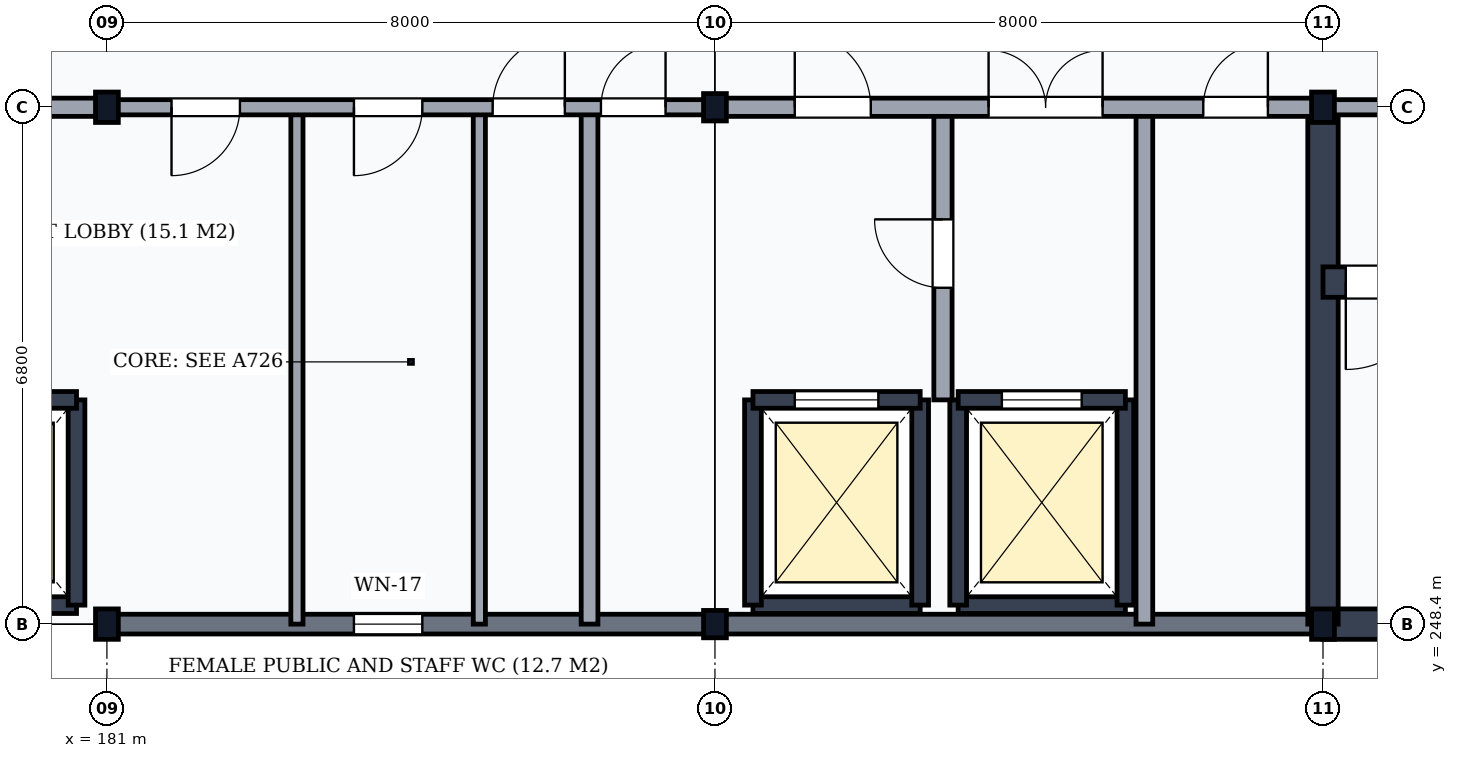
"""IFC4 building model, lengths in metres.
Left out: names, types, materials, properties, quantities, classifications, styles, units other than length and angle.
Written with IfcOpenShell. Run it as: python <this file> out.ifc"""

import sys

from ifc_helpers import new_model, si_unit, direction, frame, frame_2d, origin, origin_2d, place, context, subcontext, project, spatial, rectangle, i_section, extrude, element, fill, save


model = new_model("IFC4")
c1 = context("Model", 3, precision=1e-05, world=origin(), true_north=direction((0.0, 1.0)))
c2 = subcontext(c1, "Body", "Model", "MODEL_VIEW")
j1 = project(units=[si_unit("LENGTHUNIT", "METRE"), si_unit("PLANEANGLEUNIT", "RADIAN")], contexts=[c1])
p1 = place(None, origin())
s1 = spatial("IfcSite", under=j1, at=p1, CompositionType="ELEMENT")
p2 = place(p1, origin())
s2 = spatial("IfcBuilding", under=s1, at=p2, CompositionType="ELEMENT")
p3 = place(p2, frame((0.0, 0.0, 63.9)))
s3 = spatial("IfcBuildingStorey", under=s2, at=p3, CompositionType="ELEMENT", Elevation=63.9)
for number, where, z_axis, x_axis in (
    (1, (181.0, 248.4, 0.0), (0.0, 0.0, 1.0), (1.0, 0.0, 0.0)),
    (2, (181.0, 255.2, 0.0), (0.0, 0.0, 1.0), (1.0, 0.0, 0.0)),
):
    element("IfcColumn", number, at=place(p3, frame(where, z_axis=z_axis, x_axis=x_axis)), inside=s3, PredefinedType="COLUMN", context=c2, shape_type="SweptSolid", body=[
        extrude(i_section(OverallWidth=0.3, OverallDepth=0.4, WebThickness=0.013, FlangeThickness=0.024, FilletRadius=0.027, at=origin_2d()), origin(), (0.0, 0.0, 1.0), 3.9),
    ])
for number, where, z_axis, x_axis in (
    (3, (189.0, 248.4, 0.0), (0.0, 0.0, 1.0), (1.0, 0.0, 0.0)),
    (4, (189.0, 255.2, 0.0), (0.0, 0.0, 1.0), (1.0, 0.0, 0.0)),
):
    element("IfcColumn", number, at=place(p3, frame(where, z_axis=z_axis, x_axis=x_axis)), inside=s3, PredefinedType="COLUMN", context=c2, shape_type="SweptSolid", body=[
        extrude(i_section(OverallWidth=0.3, OverallDepth=0.36, WebThickness=0.012, FlangeThickness=0.022, FilletRadius=0.027, at=origin_2d()), origin(), (0.0, 0.0, 1.0), 3.9),
    ])
for number, where, z_axis, x_axis in (
    (5, (197.0, 248.4, 0.0), (0.0, 0.0, 1.0), (1.0, 0.0, 0.0)),
    (6, (197.0, 255.2, 0.0), (0.0, 0.0, 1.0), (1.0, 0.0, 0.0)),
):
    element("IfcColumn", number, at=place(p3, frame(where, z_axis=z_axis, x_axis=x_axis)), inside=s3, PredefinedType="COLUMN", context=c2, shape_type="SweptSolid", body=[
        extrude(i_section(OverallWidth=0.3, OverallDepth=0.4, WebThickness=0.013, FlangeThickness=0.024, FilletRadius=0.027, at=origin_2d()), origin(), (0.0, 0.0, 1.0), 3.9),
    ])
p4 = place(p3, frame((181.006, 248.4, 0.0), z_axis=(0.0, 0.0, 1.0), x_axis=(1.0, 0.0, 0.0)))
e7 = element("IfcWall", 7, at=p4, inside=s3, PredefinedType="SOLIDWALL", context=c2, shape_type="SweptSolid", body=[
    extrude(rectangle(XDim=7.988, YDim=0.26, at=frame_2d((3.994, 0.0))), origin(), (0.0, 0.0, 1.0), 3.388),
])
p5 = place(p4, frame((3.244, 0.0, 0.95)))
e8 = element("IfcOpeningElement", 8, at=p5, cuts=e7, PredefinedType="OPENING", context=c2, shape_type="SweptSolid", body=[
    extrude(rectangle(XDim=0.9, YDim=2.2, at=frame_2d((0.45, 1.1))), frame((0.0, 0.145, 0.0), z_axis=(0.0, -1.0, 0.0), x_axis=(1.0, 0.0, 0.0)), (0.0, 0.0, 1.0), 0.29),
])
p6 = place(p3, frame((189.006, 248.4, 0.0), z_axis=(0.0, 0.0, 1.0), x_axis=(1.0, 0.0, 0.0)))
e9 = element("IfcWall", 9, at=p6, inside=s3, PredefinedType="SOLIDWALL", context=c2, shape_type="SweptSolid", body=[
    extrude(rectangle(XDim=7.988, YDim=0.26, at=frame_2d((3.994, 0.0))), origin(), (0.0, 0.0, 1.0), 3.388),
])
p7 = place(p3, frame((197.0, 248.4, 0.0), z_axis=(0.0, 0.0, 1.0), x_axis=(1.0, 0.0, 0.0)))
e10 = element("IfcWall", 10, at=p7, inside=s3, PredefinedType="SHEAR", context=c2, shape_type="SweptSolid", body=[
    extrude(rectangle(XDim=8.0, YDim=0.4, at=frame_2d((4.0, 0.0))), origin(), (0.0, 0.0, 1.0), 3.7),
])
p8 = place(p3, frame((197.0, 248.4, 0.0), z_axis=(0.0, 0.0, 1.0), x_axis=(0.0, 1.0, 0.0)))
e11 = element("IfcWall", 11, at=p8, inside=s3, PredefinedType="SHEAR", context=c2, shape_type="SweptSolid", body=[
    extrude(rectangle(XDim=6.8, YDim=0.4, at=frame_2d((3.4, 0.0))), origin(), (0.0, 0.0, 1.0), 3.7),
])
p9 = place(p3, frame((197.0, 252.9, 0.0), z_axis=(0.0, 0.0, 1.0), x_axis=(1.0, 0.0, 0.0)))
e12 = element("IfcWall", 12, at=p9, inside=s3, PredefinedType="SHEAR", context=c2, shape_type="SweptSolid", body=[
    extrude(rectangle(XDim=8.0, YDim=0.4, at=frame_2d((4.0, 0.0))), origin(), (0.0, 0.0, 1.0), 3.7),
])
p10 = place(p9, frame((0.3, 0.0, 0.0)))
e13 = element("IfcOpeningElement", 13, at=p10, cuts=e12, PredefinedType="OPENING", context=c2, shape_type="SweptSolid", body=[
    extrude(rectangle(XDim=1.15, YDim=2.15, at=frame_2d((0.575, 1.075))), frame((0.0, 0.215, 0.0), z_axis=(0.0, -1.0, 0.0), x_axis=(1.0, 0.0, 0.0)), (0.0, 0.0, 1.0), 0.43),
])
p11 = place(p3, frame((197.0, 255.2, 0.0), z_axis=(0.0, 0.0, 1.0), x_axis=(1.0, 0.0, 0.0)))
e14 = element("IfcWall", 14, at=p11, inside=s3, PredefinedType="PARTITIONING", context=c2, shape_type="SweptSolid", body=[
    extrude(rectangle(XDim=8.0, YDim=0.2, at=frame_2d((4.0, 0.0))), origin(), (0.0, 0.0, 1.0), 3.148),
])
p12 = place(p11, frame((3.275, 0.0, 0.0)))
e15 = element("IfcOpeningElement", 15, at=p12, cuts=e14, PredefinedType="OPENING", context=c2, shape_type="SweptSolid", body=[
    extrude(rectangle(XDim=1.45, YDim=2.2, at=frame_2d((0.725, 1.1))), frame((0.0, 0.115, 0.0), z_axis=(0.0, -1.0, 0.0), x_axis=(1.0, 0.0, 0.0)), (0.0, 0.0, 1.0), 0.23),
])
p13 = place(p3, frame((178.4, 248.65, 0.0), z_axis=(0.0, 0.0, 1.0), x_axis=(1.0, 0.0, 0.0)))
e16 = element("IfcWall", 16, at=p13, inside=s3, PredefinedType="SHEAR", context=c2, shape_type="SweptSolid", body=[
    extrude(rectangle(XDim=2.2, YDim=0.22, at=frame_2d((1.1, 0.0))), origin(), (0.0, 0.0, 1.0), 3.7),
])
p14 = place(p3, frame((180.6, 248.65, 0.0), z_axis=(0.0, 0.0, 1.0), x_axis=(0.0, 1.0, 0.0)))
e17 = element("IfcWall", 17, at=p14, inside=s3, PredefinedType="SHEAR", context=c2, shape_type="SweptSolid", body=[
    extrude(rectangle(XDim=2.7, YDim=0.22, at=frame_2d((1.35, 0.0))), origin(), (0.0, 0.0, 1.0), 3.7),
])
p15 = place(p3, frame((178.4, 251.35, 0.0), z_axis=(0.0, 0.0, 1.0), x_axis=(1.0, 0.0, 0.0)))
e18 = element("IfcWall", 18, at=p15, inside=s3, PredefinedType="SHEAR", context=c2, shape_type="SweptSolid", body=[
    extrude(rectangle(XDim=2.2, YDim=0.22, at=frame_2d((1.1, 0.0))), origin(), (0.0, 0.0, 1.0), 3.7),
])
p16 = place(p15, frame((0.575, 0.0, 0.0)))
e19 = element("IfcOpeningElement", 19, at=p16, cuts=e18, PredefinedType="OPENING", context=c2, shape_type="SweptSolid", body=[
    extrude(rectangle(XDim=1.05, YDim=2.15, at=frame_2d((0.525, 1.075))), frame((0.0, 0.125, 0.0), z_axis=(0.0, -1.0, 0.0), x_axis=(1.0, 0.0, 0.0)), (0.0, 0.0, 1.0), 0.25),
])
p17 = place(p3, frame((189.5, 248.65, 0.0), z_axis=(0.0, 0.0, 1.0), x_axis=(1.0, 0.0, 0.0)))
e20 = element("IfcWall", 20, at=p17, inside=s3, PredefinedType="SHEAR", context=c2, shape_type="SweptSolid", body=[
    extrude(rectangle(XDim=2.2, YDim=0.22, at=frame_2d((1.1, 0.0))), origin(), (0.0, 0.0, 1.0), 3.7),
])
for number, where, z_axis, x_axis in (
    (21, (189.5, 248.65, 0.0), (0.0, 0.0, 1.0), (0.0, 1.0, 0.0)),
    (22, (191.7, 248.65, 0.0), (0.0, 0.0, 1.0), (0.0, 1.0, 0.0)),
):
    element("IfcWall", number, at=place(p3, frame(where, z_axis=z_axis, x_axis=x_axis)), inside=s3, PredefinedType="SHEAR", context=c2, shape_type="SweptSolid", body=[
        extrude(rectangle(XDim=2.7, YDim=0.22, at=frame_2d((1.35, 0.0))), origin(), (0.0, 0.0, 1.0), 3.7),
    ])
p18 = place(p3, frame((189.5, 251.35, 0.0), z_axis=(0.0, 0.0, 1.0), x_axis=(1.0, 0.0, 0.0)))
e23 = element("IfcWall", 23, at=p18, inside=s3, PredefinedType="SHEAR", context=c2, shape_type="SweptSolid", body=[
    extrude(rectangle(XDim=2.2, YDim=0.22, at=frame_2d((1.1, 0.0))), origin(), (0.0, 0.0, 1.0), 3.7),
])
p19 = place(p18, frame((0.55, 0.0, 0.0)))
e24 = element("IfcOpeningElement", 24, at=p19, cuts=e23, PredefinedType="OPENING", context=c2, shape_type="SweptSolid", body=[
    extrude(rectangle(XDim=1.1, YDim=2.15, at=frame_2d((0.55, 1.075))), frame((0.0, 0.125, 0.0), z_axis=(0.0, -1.0, 0.0), x_axis=(1.0, 0.0, 0.0)), (0.0, 0.0, 1.0), 0.25),
])
p20 = place(p3, frame((192.2, 248.65, 0.0), z_axis=(0.0, 0.0, 1.0), x_axis=(1.0, 0.0, 0.0)))
e25 = element("IfcWall", 25, at=p20, inside=s3, PredefinedType="SHEAR", context=c2, shape_type="SweptSolid", body=[
    extrude(rectangle(XDim=2.2, YDim=0.22, at=frame_2d((1.1, 0.0))), origin(), (0.0, 0.0, 1.0), 3.7),
])
for number, where, z_axis, x_axis in (
    (26, (192.2, 248.65, 0.0), (0.0, 0.0, 1.0), (0.0, 1.0, 0.0)),
    (27, (194.4, 248.65, 0.0), (0.0, 0.0, 1.0), (0.0, 1.0, 0.0)),
):
    element("IfcWall", number, at=place(p3, frame(where, z_axis=z_axis, x_axis=x_axis)), inside=s3, PredefinedType="SHEAR", context=c2, shape_type="SweptSolid", body=[
        extrude(rectangle(XDim=2.7, YDim=0.22, at=frame_2d((1.35, 0.0))), origin(), (0.0, 0.0, 1.0), 3.7),
    ])
p21 = place(p3, frame((192.2, 251.35, 0.0), z_axis=(0.0, 0.0, 1.0), x_axis=(1.0, 0.0, 0.0)))
e28 = element("IfcWall", 28, at=p21, inside=s3, PredefinedType="SHEAR", context=c2, shape_type="SweptSolid", body=[
    extrude(rectangle(XDim=2.2, YDim=0.22, at=frame_2d((1.1, 0.0))), origin(), (0.0, 0.0, 1.0), 3.7),
])
p22 = place(p21, frame((0.575, 0.0, 0.0)))
e29 = element("IfcOpeningElement", 29, at=p22, cuts=e28, PredefinedType="OPENING", context=c2, shape_type="SweptSolid", body=[
    extrude(rectangle(XDim=1.05, YDim=2.15, at=frame_2d((0.525, 1.075))), frame((0.0, 0.125, 0.0), z_axis=(0.0, -1.0, 0.0), x_axis=(1.0, 0.0, 0.0)), (0.0, 0.0, 1.0), 0.25),
])
p23 = place(p3, frame((192.0, 251.35, 0.0), z_axis=(0.0, 0.0, 1.0), x_axis=(0.0, 1.0, 0.0)))
e30 = element("IfcWall", 30, at=p23, inside=s3, PredefinedType="PARTITIONING", context=c2, shape_type="SweptSolid", body=[
    extrude(rectangle(XDim=3.85, YDim=0.24, at=frame_2d((1.925, 0.0))), origin(), (0.0, 0.0, 1.0), 3.7),
])
p24 = place(p23, frame((1.475, 0.0, 0.0)))
e31 = element("IfcOpeningElement", 31, at=p24, cuts=e30, PredefinedType="OPENING", context=c2, shape_type="SweptSolid", body=[
    extrude(rectangle(XDim=0.9, YDim=2.1, at=frame_2d((0.45, 1.05))), frame((0.0, 0.135, 0.0), z_axis=(0.0, -1.0, 0.0), x_axis=(1.0, 0.0, 0.0)), (0.0, 0.0, 1.0), 0.27),
])
p25 = place(p3, frame((194.65, 248.4, 0.0), z_axis=(0.0, 0.0, 1.0), x_axis=(0.0, 1.0, 0.0)))
e32 = element("IfcWall", 32, at=p25, inside=s3, PredefinedType="PARTITIONING", context=c2, shape_type="SweptSolid", body=[
    extrude(rectangle(XDim=6.8, YDim=0.22, at=frame_2d((3.4, 0.0))), origin(), (0.0, 0.0, 1.0), 3.7),
])
for number, where, z_axis, x_axis in (
    (33, (183.5, 248.4, 0.0), (0.0, 0.0, 1.0), (0.0, 1.0, 0.0)),
    (34, (185.9, 248.4, 0.0), (0.0, 0.0, 1.0), (0.0, 1.0, 0.0)),
):
    element("IfcWall", number, at=place(p3, frame(where, z_axis=z_axis, x_axis=x_axis)), inside=s3, PredefinedType="PARTITIONING", context=c2, shape_type="SweptSolid", body=[
        extrude(rectangle(XDim=6.8, YDim=0.16, at=frame_2d((3.4, 0.0))), origin(), (0.0, 0.0, 1.0), 3.7),
    ])
p26 = place(p3, frame((187.35, 248.4, 0.0), z_axis=(0.0, 0.0, 1.0), x_axis=(0.0, 1.0, 0.0)))
e35 = element("IfcWall", 35, at=p26, inside=s3, PredefinedType="PARTITIONING", context=c2, shape_type="SweptSolid", body=[
    extrude(rectangle(XDim=6.8, YDim=0.22, at=frame_2d((3.4, 0.0))), origin(), (0.0, 0.0, 1.0), 3.7),
])
p27 = place(p3, frame((173.0, 255.2, 0.0), z_axis=(0.0, 0.0, 1.0), x_axis=(1.0, 0.0, 0.0)))
e36 = element("IfcWall", 36, at=p27, inside=s3, PredefinedType="PARTITIONING", context=c2, shape_type="SweptSolid", body=[
    extrude(rectangle(XDim=8.0, YDim=0.24, at=frame_2d((4.0, 0.0))), origin(), (0.0, 0.0, 1.0), 3.148),
])
p28 = place(p27, frame((1.05, 0.0, 0.0)))
e37 = element("IfcOpeningElement", 37, at=p28, cuts=e36, PredefinedType="OPENING", context=c2, shape_type="SweptSolid", body=[
    extrude(rectangle(XDim=1.0, YDim=2.1, at=frame_2d((0.5, 1.05))), frame((0.0, 0.135, 0.0), z_axis=(0.0, -1.0, 0.0), x_axis=(1.0, 0.0, 0.0)), (0.0, 0.0, 1.0), 0.27),
])
p29 = place(p27, frame((4.6, 0.0, 0.0)))
e38 = element("IfcOpeningElement", 38, at=p29, cuts=e36, PredefinedType="OPENING", context=c2, shape_type="SweptSolid", body=[
    extrude(rectangle(XDim=1.6, YDim=2.25, at=frame_2d((0.8, 1.125))), frame((0.0, 0.135, 0.0), z_axis=(0.0, -1.0, 0.0), x_axis=(1.0, 0.0, 0.0)), (0.0, 0.0, 1.0), 0.27),
])
p30 = place(p3, frame((181.0, 255.2, 0.0), z_axis=(0.0, 0.0, 1.0), x_axis=(1.0, 0.0, 0.0)))
e39 = element("IfcWall", 39, at=p30, inside=s3, PredefinedType="PARTITIONING", context=c2, shape_type="SweptSolid", body=[
    extrude(rectangle(XDim=8.0, YDim=0.2, at=frame_2d((4.0, 0.0))), origin(), (0.0, 0.0, 1.0), 3.148),
])
p31 = place(p30, frame((0.85, 0.0, 0.0)))
e40 = element("IfcOpeningElement", 40, at=p31, cuts=e39, PredefinedType="OPENING", context=c2, shape_type="SweptSolid", body=[
    extrude(rectangle(XDim=0.9, YDim=2.1, at=frame_2d((0.45, 1.05))), frame((0.0, 0.115, 0.0), z_axis=(0.0, -1.0, 0.0), x_axis=(1.0, 0.0, 0.0)), (0.0, 0.0, 1.0), 0.23),
])
p32 = place(p30, frame((3.25, 0.0, 0.0)))
e41 = element("IfcOpeningElement", 41, at=p32, cuts=e39, PredefinedType="OPENING", context=c2, shape_type="SweptSolid", body=[
    extrude(rectangle(XDim=0.9, YDim=2.1, at=frame_2d((0.45, 1.05))), frame((0.0, 0.115, 0.0), z_axis=(0.0, -1.0, 0.0), x_axis=(1.0, 0.0, 0.0)), (0.0, 0.0, 1.0), 0.23),
])
p33 = place(p30, frame((5.075, 0.0, 0.0)))
e42 = element("IfcOpeningElement", 42, at=p33, cuts=e39, PredefinedType="OPENING", context=c2, shape_type="SweptSolid", body=[
    extrude(rectangle(XDim=0.95, YDim=2.1, at=frame_2d((0.475, 1.05))), frame((0.0, 0.115, 0.0), z_axis=(0.0, -1.0, 0.0), x_axis=(1.0, 0.0, 0.0)), (0.0, 0.0, 1.0), 0.23),
])
p34 = place(p30, frame((6.5, 0.0, 0.0)))
e43 = element("IfcOpeningElement", 43, at=p34, cuts=e39, PredefinedType="OPENING", context=c2, shape_type="SweptSolid", body=[
    extrude(rectangle(XDim=0.85, YDim=2.1, at=frame_2d((0.425, 1.05))), frame((0.0, 0.115, 0.0), z_axis=(0.0, -1.0, 0.0), x_axis=(1.0, 0.0, 0.0)), (0.0, 0.0, 1.0), 0.23),
])
p35 = place(p3, frame((189.0, 255.2, 0.0), z_axis=(0.0, 0.0, 1.0), x_axis=(1.0, 0.0, 0.0)))
e44 = element("IfcWall", 44, at=p35, inside=s3, PredefinedType="PARTITIONING", context=c2, shape_type="SweptSolid", body=[
    extrude(rectangle(XDim=8.0, YDim=0.24, at=frame_2d((4.0, 0.0))), origin(), (0.0, 0.0, 1.0), 3.148),
])
p36 = place(p35, frame((1.05, 0.0, 0.0)))
e45 = element("IfcOpeningElement", 45, at=p36, cuts=e44, PredefinedType="OPENING", context=c2, shape_type="SweptSolid", body=[
    extrude(rectangle(XDim=1.0, YDim=2.1, at=frame_2d((0.5, 1.05))), frame((0.0, 0.135, 0.0), z_axis=(0.0, -1.0, 0.0), x_axis=(1.0, 0.0, 0.0)), (0.0, 0.0, 1.0), 0.27),
])
p37 = place(p35, frame((3.6, 0.0, 0.0)))
e46 = element("IfcOpeningElement", 46, at=p37, cuts=e44, PredefinedType="OPENING", context=c2, shape_type="SweptSolid", body=[
    extrude(rectangle(XDim=1.5, YDim=2.25, at=frame_2d((0.75, 1.125))), frame((0.0, 0.135, 0.0), z_axis=(0.0, -1.0, 0.0), x_axis=(1.0, 0.0, 0.0)), (0.0, 0.0, 1.0), 0.27),
])
p38 = place(p35, frame((6.425, 0.0, 0.0)))
e47 = element("IfcOpeningElement", 47, at=p38, cuts=e44, PredefinedType="OPENING", context=c2, shape_type="SweptSolid", body=[
    extrude(rectangle(XDim=0.85, YDim=2.1, at=frame_2d((0.425, 1.05))), frame((0.0, 0.135, 0.0), z_axis=(0.0, -1.0, 0.0), x_axis=(1.0, 0.0, 0.0)), (0.0, 0.0, 1.0), 0.27),
])
p39 = place(p5, origin())
e48 = element("IfcWindow", 48, at=p39, inside=s3, PartitioningType="SINGLE_PANEL", PredefinedType="WINDOW", context=c2, shape_type="SweptSolid", body=[
    extrude(rectangle(XDim=0.9, YDim=2.2, at=frame_2d((0.45, 1.1))), frame((0.0, 0.03, 0.0), z_axis=(0.0, -1.0, 0.0), x_axis=(1.0, 0.0, 0.0)), (0.0, 0.0, 1.0), 0.06),
])
fill(e8, e48)
p40 = place(p10, frame((1.15, 0.0, 0.0), z_axis=(0.0, 0.0, 1.0), x_axis=(-1.0, 0.0, 0.0)))
e49 = element("IfcDoor", 49, at=p40, inside=s3, OperationType="SINGLE_SWING_RIGHT", PredefinedType="DOOR", context=c2, shape_type="SweptSolid", body=[
    extrude(rectangle(XDim=1.15, YDim=2.15, at=frame_2d((0.575, 1.075))), frame((0.0, 0.025, 0.0), z_axis=(0.0, -1.0, 0.0), x_axis=(1.0, 0.0, 0.0)), (0.0, 0.0, 1.0), 0.05),
])
fill(e13, e49)
p41 = place(p19, origin())
e50 = element("IfcDoor", 50, at=p41, inside=s3, OperationType="DOUBLE_DOOR_SLIDING", PredefinedType="USERDEFINED", context=c2, shape_type="SweptSolid", body=[
    extrude(rectangle(XDim=1.1, YDim=2.15, at=frame_2d((0.55, 1.075))), frame((0.0, 0.025, 0.0), z_axis=(0.0, -1.0, 0.0), x_axis=(1.0, 0.0, 0.0)), (0.0, 0.0, 1.0), 0.05),
])
fill(e24, e50)
p42 = place(p22, origin())
e51 = element("IfcDoor", 51, at=p42, inside=s3, OperationType="DOUBLE_DOOR_SLIDING", PredefinedType="USERDEFINED", context=c2, shape_type="SweptSolid", body=[
    extrude(rectangle(XDim=1.05, YDim=2.15, at=frame_2d((0.525, 1.075))), frame((0.0, 0.025, 0.0), z_axis=(0.0, -1.0, 0.0), x_axis=(1.0, 0.0, 0.0)), (0.0, 0.0, 1.0), 0.05),
])
fill(e29, e51)
p43 = place(p24, frame((0.9, 0.0, 0.0), z_axis=(0.0, 0.0, 1.0), x_axis=(-1.0, 0.0, 0.0)))
e52 = element("IfcDoor", 52, at=p43, inside=s3, OperationType="SINGLE_SWING_LEFT", PredefinedType="DOOR", context=c2, shape_type="SweptSolid", body=[
    extrude(rectangle(XDim=0.9, YDim=2.1, at=frame_2d((0.45, 1.05))), frame((0.0, 0.025, 0.0), z_axis=(0.0, -1.0, 0.0), x_axis=(1.0, 0.0, 0.0)), (0.0, 0.0, 1.0), 0.05),
])
fill(e31, e52)
p44 = place(p31, frame((0.9, 0.0, 0.0), z_axis=(0.0, 0.0, 1.0), x_axis=(-1.0, 0.0, 0.0)))
e53 = element("IfcDoor", 53, at=p44, inside=s3, OperationType="SINGLE_SWING_RIGHT", PredefinedType="DOOR", context=c2, shape_type="SweptSolid", body=[
    extrude(rectangle(XDim=0.9, YDim=2.1, at=frame_2d((0.45, 1.05))), frame((0.0, 0.025, 0.0), z_axis=(0.0, -1.0, 0.0), x_axis=(1.0, 0.0, 0.0)), (0.0, 0.0, 1.0), 0.05),
])
fill(e40, e53)
p45 = place(p32, frame((0.9, 0.0, 0.0), z_axis=(0.0, 0.0, 1.0), x_axis=(-1.0, 0.0, 0.0)))
e54 = element("IfcDoor", 54, at=p45, inside=s3, OperationType="SINGLE_SWING_RIGHT", PredefinedType="DOOR", context=c2, shape_type="SweptSolid", body=[
    extrude(rectangle(XDim=0.9, YDim=2.1, at=frame_2d((0.45, 1.05))), frame((0.0, 0.025, 0.0), z_axis=(0.0, -1.0, 0.0), x_axis=(1.0, 0.0, 0.0)), (0.0, 0.0, 1.0), 0.05),
])
fill(e41, e54)
p46 = place(p33, frame((0.95, 0.0, 0.0), z_axis=(0.0, 0.0, 1.0), x_axis=(-1.0, 0.0, 0.0)))
e55 = element("IfcDoor", 55, at=p46, inside=s3, OperationType="SINGLE_SWING_LEFT", PredefinedType="DOOR", context=c2, shape_type="SweptSolid", body=[
    extrude(rectangle(XDim=0.95, YDim=2.1, at=frame_2d((0.475, 1.05))), frame((0.0, 0.025, 0.0), z_axis=(0.0, -1.0, 0.0), x_axis=(1.0, 0.0, 0.0)), (0.0, 0.0, 1.0), 0.05),
])
fill(e42, e55)
p47 = place(p34, frame((0.85, 0.0, 0.0), z_axis=(0.0, 0.0, 1.0), x_axis=(-1.0, 0.0, 0.0)))
e56 = element("IfcDoor", 56, at=p47, inside=s3, OperationType="SINGLE_SWING_LEFT", PredefinedType="DOOR", context=c2, shape_type="SweptSolid", body=[
    extrude(rectangle(XDim=0.85, YDim=2.1, at=frame_2d((0.425, 1.05))), frame((0.0, 0.025, 0.0), z_axis=(0.0, -1.0, 0.0), x_axis=(1.0, 0.0, 0.0)), (0.0, 0.0, 1.0), 0.05),
])
fill(e43, e56)
p48 = place(p36, origin())
e57 = element("IfcDoor", 57, at=p48, inside=s3, OperationType="SINGLE_SWING_LEFT", PredefinedType="DOOR", context=c2, shape_type="SweptSolid", body=[
    extrude(rectangle(XDim=1.0, YDim=2.1, at=frame_2d((0.5, 1.05))), frame((0.0, 0.025, 0.0), z_axis=(0.0, -1.0, 0.0), x_axis=(1.0, 0.0, 0.0)), (0.0, 0.0, 1.0), 0.05),
])
fill(e45, e57)
p49 = place(p37, origin())
e58 = element("IfcDoor", 58, at=p49, inside=s3, OperationType="DOUBLE_DOOR_SINGLE_SWING", PredefinedType="DOOR", context=c2, shape_type="SweptSolid", body=[
    extrude(rectangle(XDim=1.5, YDim=2.25, at=frame_2d((0.75, 1.125))), frame((0.0, 0.025, 0.0), z_axis=(0.0, -1.0, 0.0), x_axis=(1.0, 0.0, 0.0)), (0.0, 0.0, 1.0), 0.05),
])
fill(e46, e58)
p50 = place(p38, frame((0.85, 0.0, 0.0), z_axis=(0.0, 0.0, 1.0), x_axis=(-1.0, 0.0, 0.0)))
e59 = element("IfcDoor", 59, at=p50, inside=s3, OperationType="SINGLE_SWING_LEFT", PredefinedType="DOOR", context=c2, shape_type="SweptSolid", body=[
    extrude(rectangle(XDim=0.85, YDim=2.1, at=frame_2d((0.425, 1.05))), frame((0.0, 0.025, 0.0), z_axis=(0.0, -1.0, 0.0), x_axis=(1.0, 0.0, 0.0)), (0.0, 0.0, 1.0), 0.05),
])
fill(e47, e59)
save(model, sys.argv[1])
